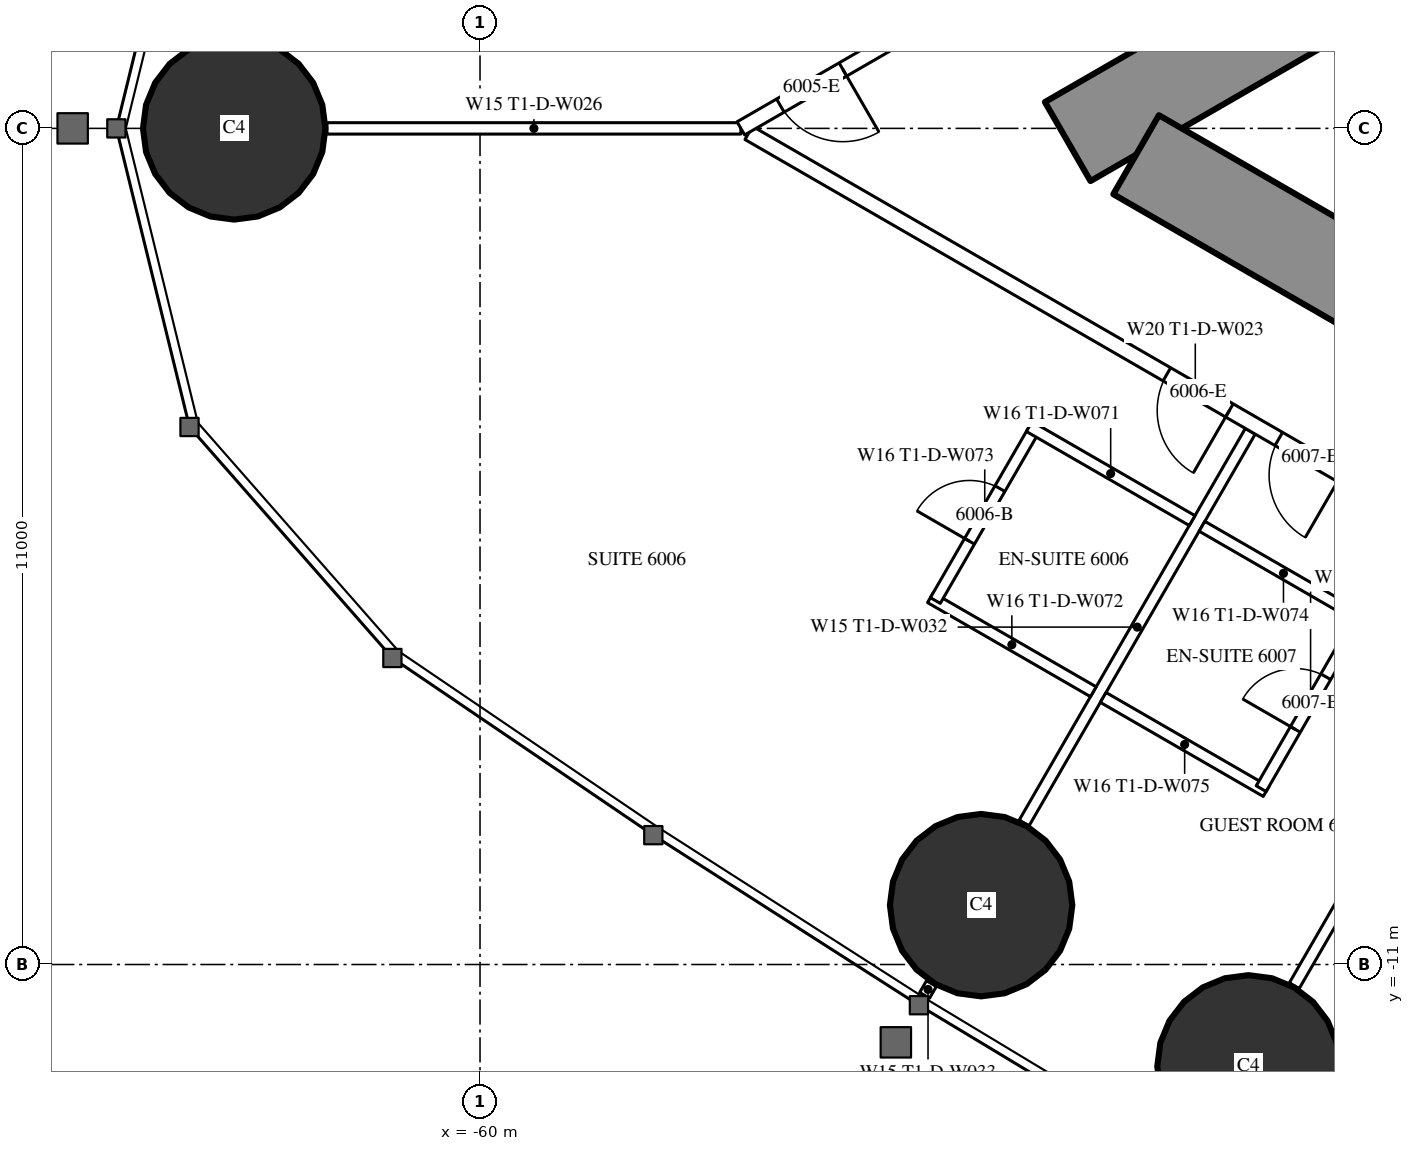
"""IFC4 building model, lengths in metres.
Left out: names, types, materials, properties, quantities, classifications, styles, units other than length and angle.
Written with IfcOpenShell. Run it as: python <this file> out.ifc"""

import sys

from ifc_helpers import new_model, si_unit, direction, frame, frame_2d, origin, origin_2d, place, context, subcontext, project, spatial, rectangle, circle, extrude, element, fill, save


model = new_model("IFC4")
c1 = context("Model", 3, precision=1e-05, world=origin(), true_north=direction((0.0, 1.0)))
c2 = subcontext(c1, "Body", "Model", "MODEL_VIEW")
j1 = project(units=[si_unit("LENGTHUNIT", "METRE"), si_unit("PLANEANGLEUNIT", "RADIAN")], contexts=[c1])
p1 = place(None, origin())
s1 = spatial("IfcSite", under=j1, at=p1, CompositionType="ELEMENT")
p2 = place(p1, origin())
s2 = spatial("IfcBuilding", under=s1, at=p2, CompositionType="ELEMENT")
p3 = place(p2, frame((0.0, 0.0, 226.1)))
s3 = spatial("IfcBuildingStorey", under=s2, at=p3, CompositionType="ELEMENT", Elevation=226.1)
for number, where, z_axis, x_axis in (
    (1, (-63.234, 0.0, 0.0), (0.0, 0.0, 1.0), (1.0, 0.0, 0.0)),
    (2, (-53.408, -10.219, 0.0), (0.0, 0.0, 1.0), (1.0, 0.0, 0.0)),
    (3, (-49.89, -12.34, 0.0), (0.0, 0.0, 1.0), (1.0, 0.0, 0.0)),
):
    element("IfcColumn", number, at=place(p3, frame(where, z_axis=z_axis, x_axis=x_axis)), inside=s3, PredefinedType="COLUMN", context=c2, shape_type="SweptSolid", body=[
        extrude(circle(Radius=1.2, at=origin_2d()), origin(), (0.0, 0.0, 1.0), 3.6),
    ])
p4 = place(p3, frame((-27.2, 14.3, 0.0), z_axis=(0.0, 0.0, 1.0), x_axis=(-0.866026593062, -0.499997940104, 0.0)))
e4 = element("IfcWall", 4, at=p4, inside=s3, PredefinedType="SHEAR", context=c2, shape_type="SweptSolid", body=[
    extrude(rectangle(XDim=28.946, YDim=1.2, at=frame_2d((14.473, 0.0))), origin(), (0.0, 0.0, 1.0), 3.6),
])
p5 = place(p4, frame((4.6, 0.0, 0.0)))
e5 = element("IfcOpeningElement", 5, at=p5, cuts=e4, PredefinedType="OPENING", context=c2, shape_type="SweptSolid", body=[
    extrude(rectangle(XDim=1.0, YDim=2.2, at=frame_2d((0.5, 1.1))), frame((0.0, 0.61, 0.0), z_axis=(0.0, -1.0, 0.0), x_axis=(1.0, 0.0, 0.0)), (0.0, 0.0, 1.0), 1.22),
])
p6 = place(p4, frame((13.395, 0.0, 0.0)))
e6 = element("IfcOpeningElement", 6, at=p6, cuts=e4, PredefinedType="OPENING", context=c2, shape_type="SweptSolid", body=[
    extrude(rectangle(XDim=1.8, YDim=2.2, at=frame_2d((0.9, 1.1))), frame((0.0, 0.61, 0.0), z_axis=(0.0, -1.0, 0.0), x_axis=(1.0, 0.0, 0.0)), (0.0, 0.0, 1.0), 1.22),
])
p7 = place(p3, frame((-27.2, -14.3, 0.0), z_axis=(0.0, 0.0, 1.0), x_axis=(-0.866024021859, 0.500002393557, 0.0)))
e7 = element("IfcWall", 7, at=p7, inside=s3, PredefinedType="SHEAR", context=c2, shape_type="SweptSolid", body=[
    extrude(rectangle(XDim=27.907, YDim=1.2, at=frame_2d((13.954, 0.0))), origin(), (0.0, 0.0, 1.0), 3.6),
])
p8 = place(p7, frame((4.6, 0.0, 0.0)))
e8 = element("IfcOpeningElement", 8, at=p8, cuts=e7, PredefinedType="OPENING", context=c2, shape_type="SweptSolid", body=[
    extrude(rectangle(XDim=1.0, YDim=2.2, at=frame_2d((0.5, 1.1))), frame((0.0, 0.61, 0.0), z_axis=(0.0, -1.0, 0.0), x_axis=(1.0, 0.0, 0.0)), (0.0, 0.0, 1.0), 1.22),
])
p9 = place(p7, frame((13.395, 0.0, 0.0)))
e9 = element("IfcOpeningElement", 9, at=p9, cuts=e7, PredefinedType="OPENING", context=c2, shape_type="SweptSolid", body=[
    extrude(rectangle(XDim=1.8, YDim=2.2, at=frame_2d((0.9, 1.1))), frame((0.0, 0.61, 0.0), z_axis=(0.0, -1.0, 0.0), x_axis=(1.0, 0.0, 0.0)), (0.0, 0.0, 1.0), 1.22),
])
p10 = place(p3, frame((-46.274, -6.059, 0.0), z_axis=(0.0, 0.0, 1.0), x_axis=(-0.500020471368, -0.866013584312, 0.0)))
e10 = element("IfcWall", 10, at=p10, inside=s3, PredefinedType="PARTITIONING", context=c2, shape_type="SweptSolid", body=[
    extrude(rectangle(XDim=6.028, YDim=0.15, at=frame_2d((3.014, 0.0))), origin(), (0.0, 0.0, 1.0), 2.45),
])
p11 = place(p3, frame((-49.866, -3.985, 0.0), z_axis=(0.0, 0.0, 1.0), x_axis=(-0.500000694566, -0.866025002776, 0.0)))
e11 = element("IfcWall", 11, at=p11, inside=s3, PredefinedType="PARTITIONING", context=c2, shape_type="SweptSolid", body=[
    extrude(rectangle(XDim=5.95, YDim=0.15, at=frame_2d((2.975, 0.0))), origin(), (0.0, 0.0, 1.0), 2.45),
])
p12 = place(p3, frame((-54.061, -11.25, 0.0), z_axis=(0.0, 0.0, 1.0), x_axis=(-0.500391173478, -0.865799441849, 0.0)))
e12 = element("IfcWall", 12, at=p12, inside=s3, PredefinedType="PARTITIONING", context=c2, shape_type="SweptSolid", body=[
    extrude(rectangle(XDim=0.179, YDim=0.15, at=frame_2d((0.089, 0.0))), origin(), (0.0, 0.0, 1.0), 2.45),
])
p13 = place(p3, frame((-56.568, 0.0, 0.0), z_axis=(0.0, 0.0, 1.0), x_axis=(-1.0, 0.0, 0.0)))
e13 = element("IfcWall", 13, at=p13, inside=s3, PredefinedType="PARTITIONING", context=c2, shape_type="SweptSolid", body=[
    extrude(rectangle(XDim=5.446, YDim=0.15, at=frame_2d((2.723, 0.0))), origin(), (0.0, 0.0, 1.0), 2.45),
])
p14 = place(p3, frame((-44.715, -6.844, 0.0), z_axis=(0.0, 0.0, 1.0), x_axis=(-0.866025261224, 0.500000246922, 0.0)))
e14 = element("IfcWall", 14, at=p14, inside=s3, PredefinedType="PARTITIONING", context=c2, shape_type="SweptSolid", body=[
    extrude(rectangle(XDim=13.567, YDim=0.2, at=frame_2d((6.783, 0.0))), origin(), (0.0, 0.0, 1.0), 3.35),
])
p15 = place(p14, frame((6.266, 0.0, 0.0)))
e15 = element("IfcOpeningElement", 15, at=p15, cuts=e14, PredefinedType="OPENING", context=c2, shape_type="SweptSolid", body=[
    extrude(rectangle(XDim=0.95, YDim=2.2, at=frame_2d((0.475, 1.1))), frame((0.0, 0.11, 0.0), z_axis=(0.0, -1.0, 0.0), x_axis=(1.0, 0.0, 0.0)), (0.0, 0.0, 1.0), 0.22),
])
p16 = place(p14, frame((4.565, 0.0, 0.0)))
e16 = element("IfcOpeningElement", 16, at=p16, cuts=e14, PredefinedType="OPENING", context=c2, shape_type="SweptSolid", body=[
    extrude(rectangle(XDim=0.95, YDim=2.2, at=frame_2d((0.475, 1.1))), frame((0.0, 0.11, 0.0), z_axis=(0.0, -1.0, 0.0), x_axis=(1.0, 0.0, 0.0)), (0.0, 0.0, 1.0), 0.22),
])
p17 = place(p14, frame((0.5, 0.0, 0.0)))
e17 = element("IfcOpeningElement", 17, at=p17, cuts=e14, PredefinedType="OPENING", context=c2, shape_type="SweptSolid", body=[
    extrude(rectangle(XDim=0.967, YDim=2.2, at=frame_2d((0.483, 1.1))), frame((0.0, 0.11, 0.0), z_axis=(0.0, -1.0, 0.0), x_axis=(1.0, 0.0, 0.0)), (0.0, 0.0, 1.0), 0.22),
])
p18 = place(p3, frame((-51.931, -7.411, 0.0), z_axis=(0.0, 0.0, 1.0), x_axis=(-0.866006523861, 0.500032699561, 0.0)))
e18 = element("IfcWall", 18, at=p18, inside=s3, PredefinedType="PARTITIONING", context=c2, shape_type="SweptSolid", body=[
    extrude(rectangle(XDim=2.475, YDim=0.15, at=frame_2d((1.237, 0.0))), origin(), (0.0, 0.0, 1.0), 3.35),
])
p19 = place(p3, frame((-52.71, -3.96, 0.0), z_axis=(0.0, 0.0, 1.0), x_axis=(-0.500006934395, -0.866021400173, 0.0)))
e19 = element("IfcWall", 19, at=p19, inside=s3, PredefinedType="PARTITIONING", context=c2, shape_type="SweptSolid", body=[
    extrude(rectangle(XDim=2.6, YDim=0.15, at=frame_2d((1.3, 0.0))), origin(), (0.0, 0.0, 1.0), 3.35),
])
p20 = place(p19, frame((0.9, 0.0, 0.0)))
e20 = element("IfcOpeningElement", 20, at=p20, cuts=e19, PredefinedType="OPENING", context=c2, shape_type="SweptSolid", body=[
    extrude(rectangle(XDim=0.8, YDim=2.2, at=frame_2d((0.4, 1.1))), frame((0.0, 0.085, 0.0), z_axis=(0.0, -1.0, 0.0), x_axis=(1.0, 0.0, 0.0)), (0.0, 0.0, 1.0), 0.17),
])
p21 = place(p3, frame((-50.631, -5.16, 0.0), z_axis=(0.0, 0.0, 1.0), x_axis=(-0.86604923931, 0.499958713387, 0.0)))
e21 = element("IfcWall", 21, at=p21, inside=s3, PredefinedType="PARTITIONING", context=c2, shape_type="SweptSolid", body=[
    extrude(rectangle(XDim=2.475, YDim=0.15, at=frame_2d((1.237, 0.0))), origin(), (0.0, 0.0, 1.0), 2.5),
])
p22 = place(p3, frame((-49.658, -8.724, 0.0), z_axis=(0.0, 0.0, 1.0), x_axis=(-0.866031185235, 0.4999899861, 0.0)))
e22 = element("IfcWall", 22, at=p22, inside=s3, PredefinedType="PARTITIONING", context=c2, shape_type="SweptSolid", body=[
    extrude(rectangle(XDim=2.475, YDim=0.15, at=frame_2d((1.238, 0.0))), origin(), (0.0, 0.0, 1.0), 3.35),
])
p23 = place(p3, frame((-48.423, -6.435, 0.0), z_axis=(0.0, 0.0, 1.0), x_axis=(-0.500006934395, -0.866021400173, 0.0)))
e23 = element("IfcWall", 23, at=p23, inside=s3, PredefinedType="PARTITIONING", context=c2, shape_type="SweptSolid", body=[
    extrude(rectangle(XDim=2.6, YDim=0.15, at=frame_2d((1.3, 0.0))), origin(), (0.0, 0.0, 1.0), 3.35),
])
p24 = place(p23, frame((0.9, 0.0, 0.0)))
e24 = element("IfcOpeningElement", 24, at=p24, cuts=e23, PredefinedType="OPENING", context=c2, shape_type="SweptSolid", body=[
    extrude(rectangle(XDim=0.8, YDim=2.2, at=frame_2d((0.4, 1.1))), frame((0.0, 0.085, 0.0), z_axis=(0.0, -1.0, 0.0), x_axis=(1.0, 0.0, 0.0)), (0.0, 0.0, 1.0), 0.17),
])
p25 = place(p3, frame((-48.358, -6.472, 0.0), z_axis=(0.0, 0.0, 1.0), x_axis=(-0.866073894602, 0.499916002032, 0.0)))
e25 = element("IfcWall", 25, at=p25, inside=s3, PredefinedType="PARTITIONING", context=c2, shape_type="SweptSolid", body=[
    extrude(rectangle(XDim=2.475, YDim=0.15, at=frame_2d((1.238, 0.0))), origin(), (0.0, 0.0, 1.0), 2.5),
])
p26 = place(p3, frame((-49.816, 3.898, 0.0), z_axis=(0.0, 0.0, 1.0), x_axis=(-0.866028102716, -0.499995325284, 0.0)))
e26 = element("IfcWall", 26, at=p26, inside=s3, PredefinedType="PARTITIONING", context=c2, shape_type="SweptSolid", body=[
    extrude(rectangle(XDim=7.796, YDim=0.2, at=frame_2d((3.898, 0.0))), origin(), (0.0, 0.0, 1.0), 3.35),
])
p27 = place(p26, frame((6.246, 0.0, 0.0)))
e27 = element("IfcOpeningElement", 27, at=p27, cuts=e26, PredefinedType="OPENING", context=c2, shape_type="SweptSolid", body=[
    extrude(rectangle(XDim=0.95, YDim=2.2, at=frame_2d((0.475, 1.1))), frame((0.0, 0.11, 0.0), z_axis=(0.0, -1.0, 0.0), x_axis=(1.0, 0.0, 0.0)), (0.0, 0.0, 1.0), 0.22),
])
p28 = place(p27, origin())
e28 = element("IfcDoor", 28, at=p28, inside=s3, OperationType="SINGLE_SWING_LEFT", PredefinedType="DOOR", context=c2, shape_type="SweptSolid", body=[
    extrude(rectangle(XDim=0.95, YDim=2.2, at=frame_2d((0.475, 1.1))), frame((0.0, 0.025, 0.0), z_axis=(0.0, -1.0, 0.0), x_axis=(1.0, 0.0, 0.0)), (0.0, 0.0, 1.0), 0.05),
])
fill(e27, e28)
p29 = place(p20, origin())
e29 = element("IfcDoor", 29, at=p29, inside=s3, OperationType="SINGLE_SWING_RIGHT", PredefinedType="DOOR", context=c2, shape_type="SweptSolid", body=[
    extrude(rectangle(XDim=0.8, YDim=2.2, at=frame_2d((0.4, 1.1))), frame((0.0, 0.025, 0.0), z_axis=(0.0, -1.0, 0.0), x_axis=(1.0, 0.0, 0.0)), (0.0, 0.0, 1.0), 0.05),
])
fill(e20, e29)
p30 = place(p15, origin())
e30 = element("IfcDoor", 30, at=p30, inside=s3, OperationType="SINGLE_SWING_LEFT", PredefinedType="DOOR", context=c2, shape_type="SweptSolid", body=[
    extrude(rectangle(XDim=0.95, YDim=2.2, at=frame_2d((0.475, 1.1))), frame((0.0, 0.025, 0.0), z_axis=(0.0, -1.0, 0.0), x_axis=(1.0, 0.0, 0.0)), (0.0, 0.0, 1.0), 0.05),
])
fill(e15, e30)
p31 = place(p24, origin())
e31 = element("IfcDoor", 31, at=p31, inside=s3, OperationType="SINGLE_SWING_RIGHT", PredefinedType="DOOR", context=c2, shape_type="SweptSolid", body=[
    extrude(rectangle(XDim=0.8, YDim=2.2, at=frame_2d((0.4, 1.1))), frame((0.0, 0.025, 0.0), z_axis=(0.0, -1.0, 0.0), x_axis=(1.0, 0.0, 0.0)), (0.0, 0.0, 1.0), 0.05),
])
fill(e24, e31)
p32 = place(p16, origin())
e32 = element("IfcDoor", 32, at=p32, inside=s3, OperationType="SINGLE_SWING_LEFT", PredefinedType="DOOR", context=c2, shape_type="SweptSolid", body=[
    extrude(rectangle(XDim=0.95, YDim=2.2, at=frame_2d((0.475, 1.1))), frame((0.0, 0.025, 0.0), z_axis=(0.0, -1.0, 0.0), x_axis=(1.0, 0.0, 0.0)), (0.0, 0.0, 1.0), 0.05),
])
fill(e16, e32)
save(model, sys.argv[1])
